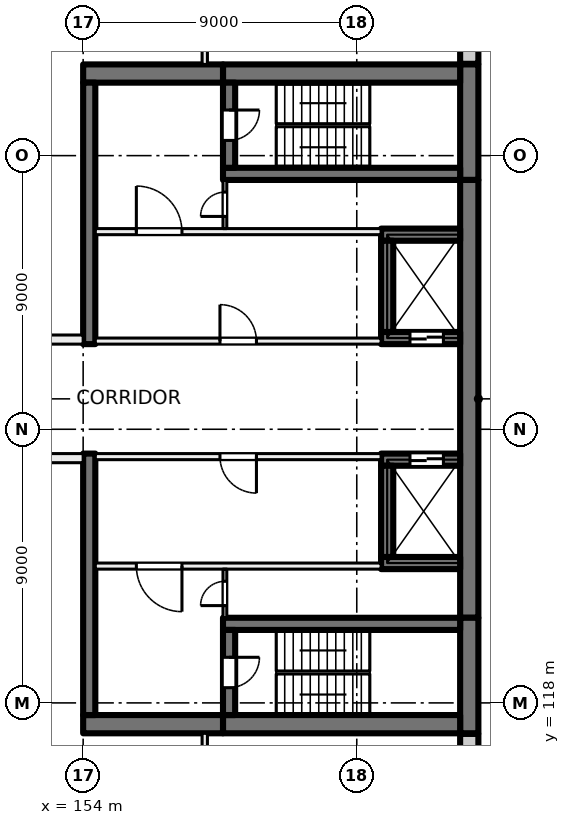
"""IFC4 building model, lengths in metres.
Left out: names, types, materials, properties, quantities, classifications, styles, units other than length and angle.
Written with IfcOpenShell. Run it as: python <this file> out.ifc"""

import sys

from ifc_helpers import new_model, si_unit, direction, frame, frame_2d, origin, place, context, subcontext, project, spatial, rectangle, extrude, element, fill, save


model = new_model("IFC4")
c1 = context("Model", 3, precision=1e-05, world=origin(), true_north=direction((0.0, 1.0)))
c2 = subcontext(c1, "Body", "Model", "MODEL_VIEW")
j1 = project(units=[si_unit("LENGTHUNIT", "METRE"), si_unit("PLANEANGLEUNIT", "RADIAN")], contexts=[c1])
p1 = place(None, origin())
s1 = spatial("IfcSite", under=j1, at=p1, CompositionType="ELEMENT")
p2 = place(p1, origin())
s2 = spatial("IfcBuilding", under=s1, at=p2, CompositionType="ELEMENT")
p3 = place(p2, frame((0.0, 0.0, 59.5)))
s3 = spatial("IfcBuildingStorey", under=s2, at=p3, CompositionType="ELEMENT", Elevation=59.5)
p4 = place(p3, frame((166.7, 139.0, 0.0), z_axis=(0.0, 0.0, 1.0), x_axis=(0.0, -1.0, 0.0)))
e1 = element("IfcWall", 1, at=p4, inside=s3, PredefinedType="SHEAR", context=c2, shape_type="SweptSolid", body=[
    extrude(rectangle(XDim=3.8, YDim=0.6, at=frame_2d((1.9, 0.0))), origin(), (0.0, 0.0, 1.0), 4.0),
])
p5 = place(p3, frame((166.7, 135.2, 0.0), z_axis=(0.0, 0.0, 1.0), x_axis=(0.0, -1.0, 0.0)))
e2 = element("IfcWall", 2, at=p5, inside=s3, PredefinedType="SHEAR", context=c2, shape_type="SweptSolid", body=[
    extrude(rectangle(XDim=14.4, YDim=0.6, at=frame_2d((7.2, 0.0))), origin(), (0.0, 0.0, 1.0), 4.0),
])
p6 = place(p3, frame((166.7, 120.8, 0.0), z_axis=(0.0, 0.0, 1.0), x_axis=(0.0, -1.0, 0.0)))
e3 = element("IfcWall", 3, at=p6, inside=s3, PredefinedType="SHEAR", context=c2, shape_type="SweptSolid", body=[
    extrude(rectangle(XDim=3.8, YDim=0.6, at=frame_2d((1.9, 0.0))), origin(), (0.0, 0.0, 1.0), 4.0),
])
for number, where, z_axis, x_axis in (
    (4, (166.4, 138.7, 0.0), (0.0, 0.0, 1.0), (-1.0, 0.0, 0.0)),
    (5, (166.4, 117.3, 0.0), (0.0, 0.0, 1.0), (-1.0, 0.0, 0.0)),
):
    element("IfcWall", number, at=place(p3, frame(where, z_axis=z_axis, x_axis=x_axis)), inside=s3, PredefinedType="SHEAR", context=c2, shape_type="SweptSolid", body=[
        extrude(rectangle(XDim=7.8, YDim=0.6, at=frame_2d((3.9, 0.0))), origin(), (0.0, 0.0, 1.0), 4.0),
    ])
for number, where, z_axis, x_axis in (
    (6, (158.6, 138.7, 0.0), (0.0, 0.0, 1.0), (-1.0, 0.0, 0.0)),
    (7, (158.6, 117.3, 0.0), (0.0, 0.0, 1.0), (-1.0, 0.0, 0.0)),
):
    element("IfcWall", number, at=place(p3, frame(where, z_axis=z_axis, x_axis=x_axis)), inside=s3, PredefinedType="SHEAR", context=c2, shape_type="SweptSolid", body=[
        extrude(rectangle(XDim=4.6, YDim=0.6, at=frame_2d((2.3, 0.0))), origin(), (0.0, 0.0, 1.0), 4.0),
    ])
p7 = place(p3, frame((166.4, 135.4, 0.0), z_axis=(0.0, 0.0, 1.0), x_axis=(-1.0, 0.0, 0.0)))
e8 = element("IfcWall", 8, at=p7, inside=s3, PredefinedType="SHEAR", context=c2, shape_type="SweptSolid", body=[
    extrude(rectangle(XDim=7.8, YDim=0.4, at=frame_2d((3.9, 0.0))), origin(), (0.0, 0.0, 1.0), 4.0),
])
p8 = place(p3, frame((158.8, 138.4, 0.0), z_axis=(0.0, 0.0, 1.0), x_axis=(0.0, -1.0, 0.0)))
e9 = element("IfcWall", 9, at=p8, inside=s3, PredefinedType="SHEAR", context=c2, shape_type="SweptSolid", body=[
    extrude(rectangle(XDim=2.8, YDim=0.4, at=frame_2d((1.4, 0.0))), origin(), (0.0, 0.0, 1.0), 4.0),
])
p9 = place(p8, frame((0.9, 0.0, 0.0)))
e10 = element("IfcOpeningElement", 10, at=p9, cuts=e9, PredefinedType="OPENING", context=c2, shape_type="SweptSolid", body=[
    extrude(rectangle(XDim=1.0, YDim=2.1, at=frame_2d((0.5, 1.05))), frame((0.0, 0.21, 0.0), z_axis=(0.0, -1.0, 0.0), x_axis=(1.0, 0.0, 0.0)), (0.0, 0.0, 1.0), 0.42),
])
p10 = place(p3, frame((166.4, 120.6, 0.0), z_axis=(0.0, 0.0, 1.0), x_axis=(-1.0, 0.0, 0.0)))
e11 = element("IfcWall", 11, at=p10, inside=s3, PredefinedType="SHEAR", context=c2, shape_type="SweptSolid", body=[
    extrude(rectangle(XDim=7.8, YDim=0.4, at=frame_2d((3.9, 0.0))), origin(), (0.0, 0.0, 1.0), 4.0),
])
p11 = place(p3, frame((158.8, 120.4, 0.0), z_axis=(0.0, 0.0, 1.0), x_axis=(0.0, -1.0, 0.0)))
e12 = element("IfcWall", 12, at=p11, inside=s3, PredefinedType="SHEAR", context=c2, shape_type="SweptSolid", body=[
    extrude(rectangle(XDim=2.8, YDim=0.4, at=frame_2d((1.4, 0.0))), origin(), (0.0, 0.0, 1.0), 4.0),
])
p12 = place(p11, frame((0.9, 0.0, 0.0)))
e13 = element("IfcOpeningElement", 13, at=p12, cuts=e12, PredefinedType="OPENING", context=c2, shape_type="SweptSolid", body=[
    extrude(rectangle(XDim=1.0, YDim=2.1, at=frame_2d((0.5, 1.05))), frame((0.0, 0.21, 0.0), z_axis=(0.0, -1.0, 0.0), x_axis=(1.0, 0.0, 0.0)), (0.0, 0.0, 1.0), 0.42),
])
p13 = place(p3, frame((166.4, 130.0, 0.0), z_axis=(0.0, 0.0, 1.0), x_axis=(-1.0, 0.0, 0.0)))
e14 = element("IfcWall", 14, at=p13, inside=s3, PredefinedType="SHEAR", context=c2, shape_type="SweptSolid", body=[
    extrude(rectangle(XDim=2.6, YDim=0.4, at=frame_2d((1.3, 0.0))), origin(), (0.0, 0.0, 1.0), 4.0),
])
p14 = place(p13, frame((0.55, 0.0, 0.0)))
e15 = element("IfcOpeningElement", 15, at=p14, cuts=e14, PredefinedType="OPENING", context=c2, shape_type="SweptSolid", body=[
    extrude(rectangle(XDim=1.1, YDim=2.1, at=frame_2d((0.55, 1.05))), frame((0.0, 0.21, 0.0), z_axis=(0.0, -1.0, 0.0), x_axis=(1.0, 0.0, 0.0)), (0.0, 0.0, 1.0), 0.42),
])
p15 = place(p3, frame((166.4, 133.4, 0.0), z_axis=(0.0, 0.0, 1.0), x_axis=(-1.0, 0.0, 0.0)))
e16 = element("IfcWall", 16, at=p15, inside=s3, PredefinedType="SHEAR", context=c2, shape_type="SweptSolid", body=[
    extrude(rectangle(XDim=2.6, YDim=0.4, at=frame_2d((1.3, 0.0))), origin(), (0.0, 0.0, 1.0), 4.0),
])
p16 = place(p3, frame((164.0, 133.2, 0.0), z_axis=(0.0, 0.0, 1.0), x_axis=(0.0, -1.0, 0.0)))
e17 = element("IfcWall", 17, at=p16, inside=s3, PredefinedType="SHEAR", context=c2, shape_type="SweptSolid", body=[
    extrude(rectangle(XDim=3.0, YDim=0.4, at=frame_2d((1.5, 0.0))), origin(), (0.0, 0.0, 1.0), 4.0),
])
p17 = place(p3, frame((166.4, 126.0, 0.0), z_axis=(0.0, 0.0, 1.0), x_axis=(-1.0, 0.0, 0.0)))
e18 = element("IfcWall", 18, at=p17, inside=s3, PredefinedType="SHEAR", context=c2, shape_type="SweptSolid", body=[
    extrude(rectangle(XDim=2.6, YDim=0.4, at=frame_2d((1.3, 0.0))), origin(), (0.0, 0.0, 1.0), 4.0),
])
p18 = place(p17, frame((0.55, 0.0, 0.0)))
e19 = element("IfcOpeningElement", 19, at=p18, cuts=e18, PredefinedType="OPENING", context=c2, shape_type="SweptSolid", body=[
    extrude(rectangle(XDim=1.1, YDim=2.1, at=frame_2d((0.55, 1.05))), frame((0.0, 0.21, 0.0), z_axis=(0.0, -1.0, 0.0), x_axis=(1.0, 0.0, 0.0)), (0.0, 0.0, 1.0), 0.42),
])
p19 = place(p3, frame((166.4, 122.6, 0.0), z_axis=(0.0, 0.0, 1.0), x_axis=(-1.0, 0.0, 0.0)))
e20 = element("IfcWall", 20, at=p19, inside=s3, PredefinedType="SHEAR", context=c2, shape_type="SweptSolid", body=[
    extrude(rectangle(XDim=2.6, YDim=0.4, at=frame_2d((1.3, 0.0))), origin(), (0.0, 0.0, 1.0), 4.0),
])
p20 = place(p3, frame((164.0, 125.8, 0.0), z_axis=(0.0, 0.0, 1.0), x_axis=(0.0, -1.0, 0.0)))
e21 = element("IfcWall", 21, at=p20, inside=s3, PredefinedType="SHEAR", context=c2, shape_type="SweptSolid", body=[
    extrude(rectangle(XDim=3.0, YDim=0.4, at=frame_2d((1.5, 0.0))), origin(), (0.0, 0.0, 1.0), 4.0),
])
for number, where, z_axis, x_axis in (
    (22, (154.2, 138.4, 0.0), (0.0, 0.0, 1.0), (0.0, -1.0, 0.0)),
    (23, (154.2, 126.2, 0.0), (0.0, 0.0, 1.0), (0.0, -1.0, 0.0)),
):
    element("IfcWall", number, at=place(p3, frame(where, z_axis=z_axis, x_axis=x_axis)), inside=s3, PredefinedType="SHEAR", context=c2, shape_type="SweptSolid", body=[
        extrude(rectangle(XDim=8.6, YDim=0.4, at=frame_2d((4.3, 0.0))), origin(), (0.0, 0.0, 1.0), 4.0),
    ])
p21 = place(p3, frame((166.7, 116.98, 0.0), z_axis=(0.0, 0.0, 1.0), x_axis=(0.0, -1.0, 0.0)))
e24 = element("IfcWall", 24, at=p21, inside=s3, PredefinedType="SOLIDWALL", context=c2, shape_type="SweptSolid", body=[
    extrude(rectangle(XDim=2.98, YDim=0.6, at=frame_2d((1.49, 0.0))), origin(), (0.0, 0.0, 1.0), 3.625),
])
p22 = place(p3, frame((166.7, 141.93, 0.0), z_axis=(0.0, 0.0, 1.0), x_axis=(0.0, -1.0, 0.0)))
e25 = element("IfcWall", 25, at=p22, inside=s3, PredefinedType="SOLIDWALL", context=c2, shape_type="SweptSolid", body=[
    extrude(rectangle(XDim=2.91, YDim=0.6, at=frame_2d((1.455, 0.0))), origin(), (0.0, 0.0, 1.0), 3.625),
])
p23 = place(p3, frame((163.8, 126.1, 0.0), z_axis=(0.0, 0.0, 1.0), x_axis=(-1.0, 0.0, 0.0)))
e26 = element("IfcWall", 26, at=p23, inside=s3, PredefinedType="PARTITIONING", context=c2, shape_type="SweptSolid", body=[
    extrude(rectangle(XDim=9.4, YDim=0.2, at=frame_2d((4.7, 0.0))), origin(), (0.0, 0.0, 1.0), 3.625),
])
p24 = place(p23, frame((4.1, 0.0, 0.0)))
e27 = element("IfcOpeningElement", 27, at=p24, cuts=e26, PredefinedType="OPENING", context=c2, shape_type="SweptSolid", body=[
    extrude(rectangle(XDim=1.2, YDim=2.1, at=frame_2d((0.6, 1.05))), frame((0.0, 0.11, 0.0), z_axis=(0.0, -1.0, 0.0), x_axis=(1.0, 0.0, 0.0)), (0.0, 0.0, 1.0), 0.22),
])
p25 = place(p3, frame((163.8, 122.5, 0.0), z_axis=(0.0, 0.0, 1.0), x_axis=(-1.0, 0.0, 0.0)))
e28 = element("IfcWall", 28, at=p25, inside=s3, PredefinedType="PARTITIONING", context=c2, shape_type="SweptSolid", body=[
    extrude(rectangle(XDim=9.4, YDim=0.2, at=frame_2d((4.7, 0.0))), origin(), (0.0, 0.0, 1.0), 3.625),
])
p26 = place(p25, frame((6.55, 0.0, 0.0)))
e29 = element("IfcOpeningElement", 29, at=p26, cuts=e28, PredefinedType="OPENING", context=c2, shape_type="SweptSolid", body=[
    extrude(rectangle(XDim=1.5, YDim=2.1, at=frame_2d((0.75, 1.05))), frame((0.0, 0.11, 0.0), z_axis=(0.0, -1.0, 0.0), x_axis=(1.0, 0.0, 0.0)), (0.0, 0.0, 1.0), 0.22),
])
p27 = place(p3, frame((158.663, 120.8, 0.0), z_axis=(0.0, 0.0, 1.0), x_axis=(0.0, 1.0, 0.0)))
e30 = element("IfcWall", 30, at=p27, inside=s3, PredefinedType="PARTITIONING", context=c2, shape_type="SweptSolid", body=[
    extrude(rectangle(XDim=1.6, YDim=0.125, at=frame_2d((0.8, 0.0))), origin(), (0.0, 0.0, 1.0), 3.625),
])
p28 = place(p27, frame((0.4, 0.0, 0.0)))
e31 = element("IfcOpeningElement", 31, at=p28, cuts=e30, PredefinedType="OPENING", context=c2, shape_type="SweptSolid", body=[
    extrude(rectangle(XDim=0.8, YDim=2.1, at=frame_2d((0.4, 1.05))), frame((0.0, 0.073, 0.0), z_axis=(0.0, -1.0, 0.0), x_axis=(1.0, 0.0, 0.0)), (0.0, 0.0, 1.0), 0.145),
])
p29 = place(p3, frame((154.4, 129.9, 0.0), z_axis=(0.0, 0.0, 1.0), x_axis=(1.0, 0.0, 0.0)))
e32 = element("IfcWall", 32, at=p29, inside=s3, PredefinedType="PARTITIONING", context=c2, shape_type="SweptSolid", body=[
    extrude(rectangle(XDim=9.4, YDim=0.2, at=frame_2d((4.7, 0.0))), origin(), (0.0, 0.0, 1.0), 3.625),
])
p30 = place(p29, frame((4.1, 0.0, 0.0)))
e33 = element("IfcOpeningElement", 33, at=p30, cuts=e32, PredefinedType="OPENING", context=c2, shape_type="SweptSolid", body=[
    extrude(rectangle(XDim=1.2, YDim=2.1, at=frame_2d((0.6, 1.05))), frame((0.0, 0.11, 0.0), z_axis=(0.0, -1.0, 0.0), x_axis=(1.0, 0.0, 0.0)), (0.0, 0.0, 1.0), 0.22),
])
p31 = place(p3, frame((154.4, 133.5, 0.0), z_axis=(0.0, 0.0, 1.0), x_axis=(1.0, 0.0, 0.0)))
e34 = element("IfcWall", 34, at=p31, inside=s3, PredefinedType="PARTITIONING", context=c2, shape_type="SweptSolid", body=[
    extrude(rectangle(XDim=9.4, YDim=0.2, at=frame_2d((4.7, 0.0))), origin(), (0.0, 0.0, 1.0), 3.625),
])
p32 = place(p31, frame((1.35, 0.0, 0.0)))
e35 = element("IfcOpeningElement", 35, at=p32, cuts=e34, PredefinedType="OPENING", context=c2, shape_type="SweptSolid", body=[
    extrude(rectangle(XDim=1.5, YDim=2.1, at=frame_2d((0.75, 1.05))), frame((0.0, 0.11, 0.0), z_axis=(0.0, -1.0, 0.0), x_axis=(1.0, 0.0, 0.0)), (0.0, 0.0, 1.0), 0.22),
])
p33 = place(p3, frame((158.663, 133.6, 0.0), z_axis=(0.0, 0.0, 1.0), x_axis=(0.0, 1.0, 0.0)))
e36 = element("IfcWall", 36, at=p33, inside=s3, PredefinedType="PARTITIONING", context=c2, shape_type="SweptSolid", body=[
    extrude(rectangle(XDim=1.6, YDim=0.125, at=frame_2d((0.8, 0.0))), origin(), (0.0, 0.0, 1.0), 3.625),
])
p34 = place(p33, frame((0.4, 0.0, 0.0)))
e37 = element("IfcOpeningElement", 37, at=p34, cuts=e36, PredefinedType="OPENING", context=c2, shape_type="SweptSolid", body=[
    extrude(rectangle(XDim=0.8, YDim=2.1, at=frame_2d((0.4, 1.05))), frame((0.0, 0.073, 0.0), z_axis=(0.0, -1.0, 0.0), x_axis=(1.0, 0.0, 0.0)), (0.0, 0.0, 1.0), 0.145),
])
p35 = place(p3, frame((140.0, 129.95, 0.0), z_axis=(0.0, 0.0, 1.0), x_axis=(1.0, 0.0, 0.0)))
e38 = element("IfcWall", 38, at=p35, inside=s3, PredefinedType="PARTITIONING", context=c2, shape_type="SweptSolid", body=[
    extrude(rectangle(XDim=14.0, YDim=0.3, at=frame_2d((7.0, 0.0))), origin(), (0.0, 0.0, 1.0), 3.625),
])
p36 = place(p35, frame((2.75, 0.0, 0.0)))
e39 = element("IfcOpeningElement", 39, at=p36, cuts=e38, PredefinedType="OPENING", context=c2, shape_type="SweptSolid", body=[
    extrude(rectangle(XDim=1.0, YDim=2.1, at=frame_2d((0.5, 1.05))), frame((0.0, 0.16, 0.0), z_axis=(0.0, -1.0, 0.0), x_axis=(1.0, 0.0, 0.0)), (0.0, 0.0, 1.0), 0.32),
])
p37 = place(p35, frame((10.6, 0.0, 0.0)))
e40 = element("IfcOpeningElement", 40, at=p37, cuts=e38, PredefinedType="OPENING", context=c2, shape_type="SweptSolid", body=[
    extrude(rectangle(XDim=1.8, YDim=2.1, at=frame_2d((0.9, 1.05))), frame((0.0, 0.16, 0.0), z_axis=(0.0, -1.0, 0.0), x_axis=(1.0, 0.0, 0.0)), (0.0, 0.0, 1.0), 0.32),
])
p38 = place(p3, frame((154.0, 126.05, 0.0), z_axis=(0.0, 0.0, 1.0), x_axis=(-1.0, 0.0, 0.0)))
e41 = element("IfcWall", 41, at=p38, inside=s3, PredefinedType="PARTITIONING", context=c2, shape_type="SweptSolid", body=[
    extrude(rectangle(XDim=14.0, YDim=0.3, at=frame_2d((7.0, 0.0))), origin(), (0.0, 0.0, 1.0), 3.625),
])
p39 = place(p38, frame((6.1, 0.0, 0.0)))
e42 = element("IfcOpeningElement", 42, at=p39, cuts=e41, PredefinedType="OPENING", context=c2, shape_type="SweptSolid", body=[
    extrude(rectangle(XDim=1.8, YDim=2.1, at=frame_2d((0.9, 1.05))), frame((0.0, 0.16, 0.0), z_axis=(0.0, -1.0, 0.0), x_axis=(1.0, 0.0, 0.0)), (0.0, 0.0, 1.0), 0.32),
])
p40 = place(p3, frame((158.0, 110.6, 0.0), z_axis=(0.0, 0.0, 1.0), x_axis=(0.0, 1.0, 0.0)))
e43 = element("IfcWall", 43, at=p40, inside=s3, PredefinedType="PARTITIONING", context=c2, shape_type="SweptSolid", body=[
    extrude(rectangle(XDim=6.4, YDim=0.175, at=frame_2d((3.2, 0.0))), origin(), (0.0, 0.0, 1.0), 3.625),
])
p41 = place(p40, frame((2.6, 0.0, 0.0)))
e44 = element("IfcOpeningElement", 44, at=p41, cuts=e43, PredefinedType="OPENING", context=c2, shape_type="SweptSolid", body=[
    extrude(rectangle(XDim=1.2, YDim=2.1, at=frame_2d((0.6, 1.05))), frame((0.0, 0.097, 0.0), z_axis=(0.0, -1.0, 0.0), x_axis=(1.0, 0.0, 0.0)), (0.0, 0.0, 1.0), 0.195),
])
p42 = place(p3, frame((158.0, 139.0, 0.0), z_axis=(0.0, 0.0, 1.0), x_axis=(0.0, 1.0, 0.0)))
e45 = element("IfcWall", 45, at=p42, inside=s3, PredefinedType="PARTITIONING", context=c2, shape_type="SweptSolid", body=[
    extrude(rectangle(XDim=6.4, YDim=0.175, at=frame_2d((3.2, 0.0))), origin(), (0.0, 0.0, 1.0), 3.625),
])
p43 = place(p42, frame((2.6, 0.0, 0.0)))
e46 = element("IfcOpeningElement", 46, at=p43, cuts=e45, PredefinedType="OPENING", context=c2, shape_type="SweptSolid", body=[
    extrude(rectangle(XDim=1.2, YDim=2.1, at=frame_2d((0.6, 1.05))), frame((0.0, 0.097, 0.0), z_axis=(0.0, -1.0, 0.0), x_axis=(1.0, 0.0, 0.0)), (0.0, 0.0, 1.0), 0.195),
])
p44 = place(p18, origin())
e47 = element("IfcDoor", 47, at=p44, inside=s3, OperationType="DOUBLE_DOOR_SLIDING", PredefinedType="DOOR", context=c2, shape_type="SweptSolid", body=[
    extrude(rectangle(XDim=1.1, YDim=2.1, at=frame_2d((0.55, 1.05))), frame((0.0, 0.025, 0.0), z_axis=(0.0, -1.0, 0.0), x_axis=(1.0, 0.0, 0.0)), (0.0, 0.0, 1.0), 0.05),
])
fill(e19, e47)
p45 = place(p14, origin())
e48 = element("IfcDoor", 48, at=p45, inside=s3, OperationType="DOUBLE_DOOR_SLIDING", PredefinedType="DOOR", context=c2, shape_type="SweptSolid", body=[
    extrude(rectangle(XDim=1.1, YDim=2.1, at=frame_2d((0.55, 1.05))), frame((0.0, 0.025, 0.0), z_axis=(0.0, -1.0, 0.0), x_axis=(1.0, 0.0, 0.0)), (0.0, 0.0, 1.0), 0.05),
])
fill(e15, e48)
p46 = place(p24, origin())
e49 = element("IfcDoor", 49, at=p46, inside=s3, OperationType="DOUBLE_DOOR_SINGLE_SWING", PredefinedType="DOOR", context=c2, shape_type="SweptSolid", body=[
    extrude(rectangle(XDim=1.2, YDim=2.1, at=frame_2d((0.6, 1.05))), frame((0.0, 0.025, 0.0), z_axis=(0.0, -1.0, 0.0), x_axis=(1.0, 0.0, 0.0)), (0.0, 0.0, 1.0), 0.05),
])
fill(e27, e49)
p47 = place(p26, origin())
e50 = element("IfcDoor", 50, at=p47, inside=s3, OperationType="DOUBLE_DOOR_SINGLE_SWING", PredefinedType="DOOR", context=c2, shape_type="SweptSolid", body=[
    extrude(rectangle(XDim=1.5, YDim=2.1, at=frame_2d((0.75, 1.05))), frame((0.0, 0.025, 0.0), z_axis=(0.0, -1.0, 0.0), x_axis=(1.0, 0.0, 0.0)), (0.0, 0.0, 1.0), 0.05),
])
fill(e29, e50)
p48 = place(p12, origin())
e51 = element("IfcDoor", 51, at=p48, inside=s3, OperationType="SINGLE_SWING_LEFT", PredefinedType="DOOR", context=c2, shape_type="SweptSolid", body=[
    extrude(rectangle(XDim=1.0, YDim=2.1, at=frame_2d((0.5, 1.05))), frame((0.0, 0.025, 0.0), z_axis=(0.0, -1.0, 0.0), x_axis=(1.0, 0.0, 0.0)), (0.0, 0.0, 1.0), 0.05),
])
fill(e13, e51)
p49 = place(p28, origin())
e52 = element("IfcDoor", 52, at=p49, inside=s3, OperationType="SINGLE_SWING_RIGHT", PredefinedType="DOOR", context=c2, shape_type="SweptSolid", body=[
    extrude(rectangle(XDim=0.8, YDim=2.1, at=frame_2d((0.4, 1.05))), frame((0.0, 0.025, 0.0), z_axis=(0.0, -1.0, 0.0), x_axis=(1.0, 0.0, 0.0)), (0.0, 0.0, 1.0), 0.05),
])
fill(e31, e52)
p50 = place(p30, origin())
e53 = element("IfcDoor", 53, at=p50, inside=s3, OperationType="DOUBLE_DOOR_SINGLE_SWING", PredefinedType="DOOR", context=c2, shape_type="SweptSolid", body=[
    extrude(rectangle(XDim=1.2, YDim=2.1, at=frame_2d((0.6, 1.05))), frame((0.0, 0.025, 0.0), z_axis=(0.0, -1.0, 0.0), x_axis=(1.0, 0.0, 0.0)), (0.0, 0.0, 1.0), 0.05),
])
fill(e33, e53)
p51 = place(p32, origin())
e54 = element("IfcDoor", 54, at=p51, inside=s3, OperationType="DOUBLE_DOOR_SINGLE_SWING", PredefinedType="DOOR", context=c2, shape_type="SweptSolid", body=[
    extrude(rectangle(XDim=1.5, YDim=2.1, at=frame_2d((0.75, 1.05))), frame((0.0, 0.025, 0.0), z_axis=(0.0, -1.0, 0.0), x_axis=(1.0, 0.0, 0.0)), (0.0, 0.0, 1.0), 0.05),
])
fill(e35, e54)
p52 = place(p9, origin())
e55 = element("IfcDoor", 55, at=p52, inside=s3, OperationType="SINGLE_SWING_RIGHT", PredefinedType="DOOR", context=c2, shape_type="SweptSolid", body=[
    extrude(rectangle(XDim=1.0, YDim=2.1, at=frame_2d((0.5, 1.05))), frame((0.0, 0.025, 0.0), z_axis=(0.0, -1.0, 0.0), x_axis=(1.0, 0.0, 0.0)), (0.0, 0.0, 1.0), 0.05),
])
fill(e10, e55)
p53 = place(p34, origin())
e56 = element("IfcDoor", 56, at=p53, inside=s3, OperationType="SINGLE_SWING_LEFT", PredefinedType="DOOR", context=c2, shape_type="SweptSolid", body=[
    extrude(rectangle(XDim=0.8, YDim=2.1, at=frame_2d((0.4, 1.05))), frame((0.0, 0.025, 0.0), z_axis=(0.0, -1.0, 0.0), x_axis=(1.0, 0.0, 0.0)), (0.0, 0.0, 1.0), 0.05),
])
fill(e37, e56)
save(model, sys.argv[1])
